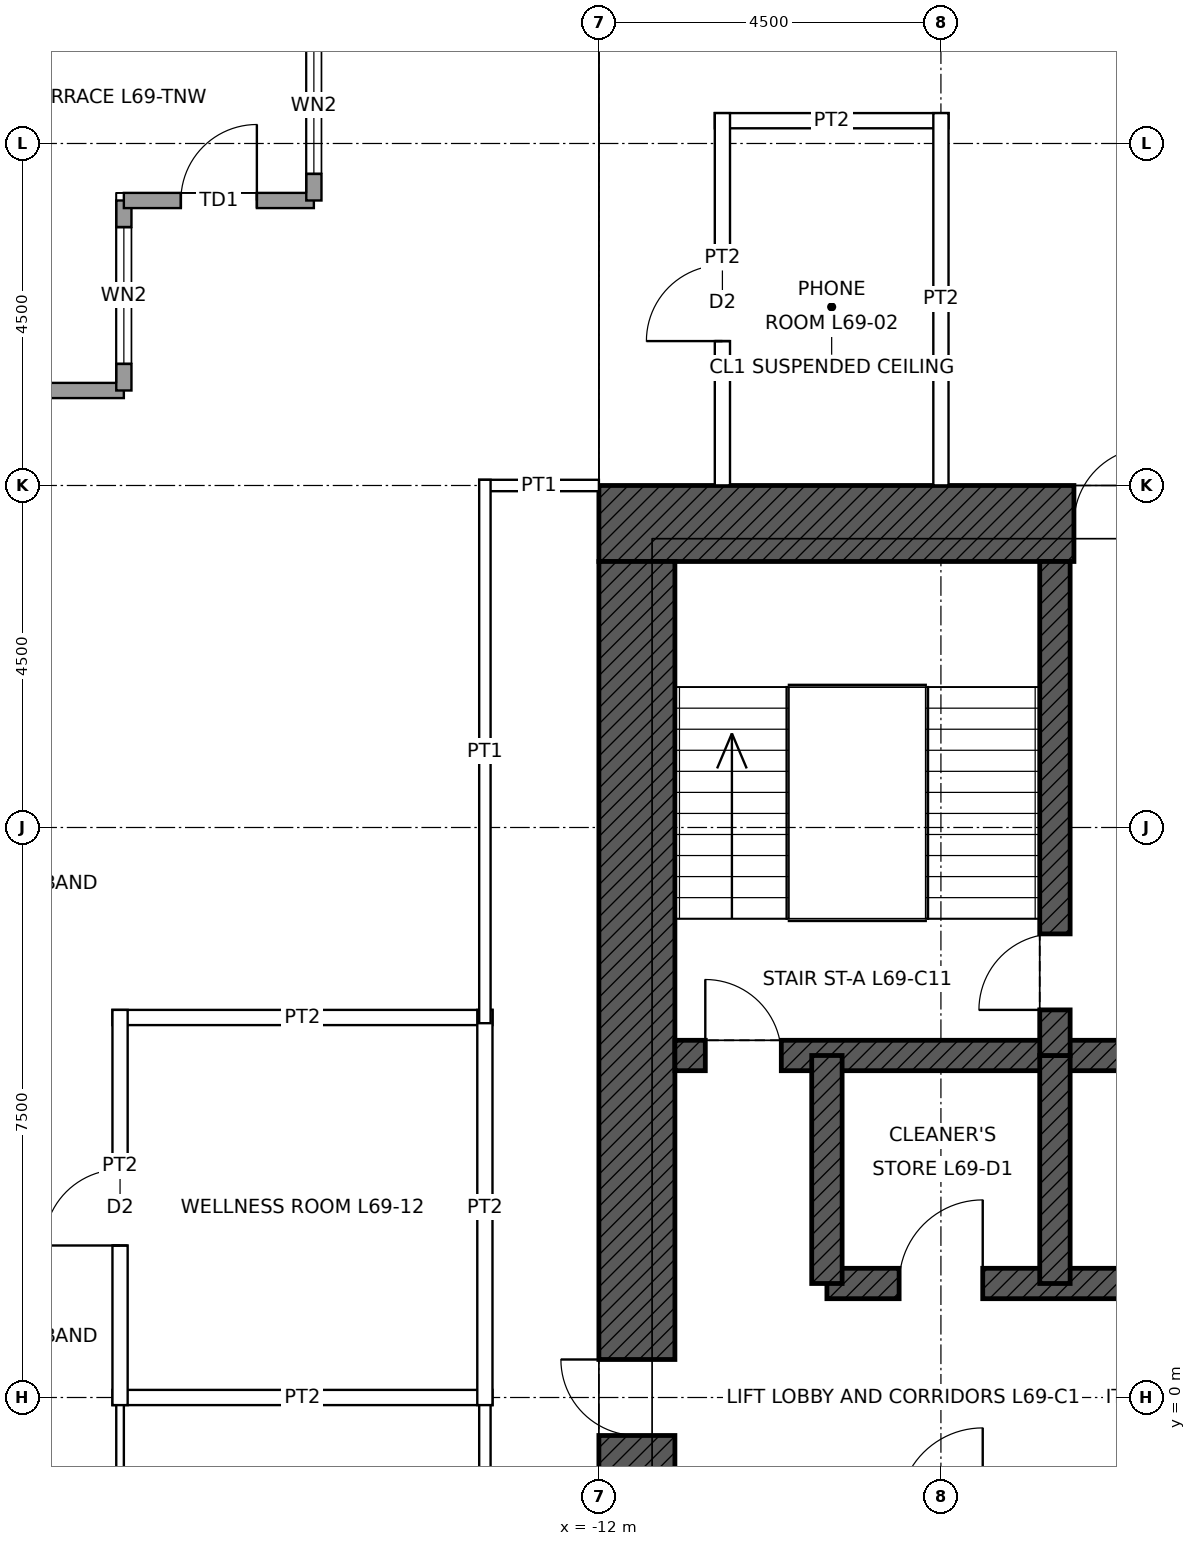
"""IFC4 building model, lengths in metres.
Left out: names, types, materials, properties, quantities, classifications, styles, units other than length and angle.
Written with IfcOpenShell. Run it as: python <this file> out.ifc"""

import sys

from ifc_helpers import new_model, si_unit, direction, frame, frame_2d, origin, place, context, subcontext, project, spatial, rectangle, extrude, element, fill, save


model = new_model("IFC4")
c1 = context("Model", 3, precision=1e-05, world=origin(), true_north=direction((0.0, 1.0)))
c2 = subcontext(c1, "Body", "Model", "MODEL_VIEW")
j1 = project(units=[si_unit("LENGTHUNIT", "METRE"), si_unit("PLANEANGLEUNIT", "RADIAN")], contexts=[c1])
p1 = place(None, origin())
s1 = spatial("IfcSite", under=j1, at=p1, CompositionType="ELEMENT")
p2 = place(p1, origin())
s2 = spatial("IfcBuilding", under=s1, at=p2, CompositionType="ELEMENT")
p3 = place(p2, frame((0.0, 0.0, 311.9)))
s3 = spatial("IfcBuildingStorey", under=s2, at=p3, CompositionType="ELEMENT", Elevation=311.9)
p4 = place(p3, frame((-12.0, 11.5, 0.0), z_axis=(0.0, 0.0, 1.0), x_axis=(1.0, 0.0, 0.0)))
e1 = element("IfcWall", 1, at=p4, inside=s3, PredefinedType="SHEAR", context=c2, shape_type="SweptSolid", body=[
    extrude(rectangle(XDim=24.0, YDim=1.0, at=frame_2d((12.0, 0.0))), origin(), (0.0, 0.0, 1.0), 4.0),
])
p5 = place(p4, frame((6.25, 0.0, 0.0)))
e2 = element("IfcOpeningElement", 2, at=p5, cuts=e1, PredefinedType="OPENING", context=c2, shape_type="SweptSolid", body=[
    extrude(rectangle(XDim=1.0, YDim=2.4, at=frame_2d((0.5, 1.2))), frame((0.0, 0.51, 0.0), z_axis=(0.0, -1.0, 0.0), x_axis=(1.0, 0.0, 0.0)), (0.0, 0.0, 1.0), 1.02),
])
p6 = place(p4, frame((16.75, 0.0, 0.0)))
e3 = element("IfcOpeningElement", 3, at=p6, cuts=e1, PredefinedType="OPENING", context=c2, shape_type="SweptSolid", body=[
    extrude(rectangle(XDim=1.0, YDim=2.4, at=frame_2d((0.5, 1.2))), frame((0.0, 0.51, 0.0), z_axis=(0.0, -1.0, 0.0), x_axis=(1.0, 0.0, 0.0)), (0.0, 0.0, 1.0), 1.02),
])
p7 = place(p3, frame((-11.5, -11.0, 0.0), z_axis=(0.0, 0.0, 1.0), x_axis=(0.0, 1.0, 0.0)))
e4 = element("IfcWall", 4, at=p7, inside=s3, PredefinedType="SHEAR", context=c2, shape_type="SweptSolid", body=[
    extrude(rectangle(XDim=22.0, YDim=1.0, at=frame_2d((11.0, 0.0))), origin(), (0.0, 0.0, 1.0), 4.0),
])
p8 = place(p7, frame((10.5, 0.0, 0.0)))
e5 = element("IfcOpeningElement", 5, at=p8, cuts=e4, PredefinedType="OPENING", context=c2, shape_type="SweptSolid", body=[
    extrude(rectangle(XDim=1.0, YDim=2.4, at=frame_2d((0.5, 1.2))), frame((0.0, 0.51, 0.0), z_axis=(0.0, -1.0, 0.0), x_axis=(1.0, 0.0, 0.0)), (0.0, 0.0, 1.0), 1.02),
])
p9 = place(p3, frame((-11.0, 4.5, 0.0), z_axis=(0.0, 0.0, 1.0), x_axis=(1.0, 0.0, 0.0)))
e6 = element("IfcWall", 6, at=p9, inside=s3, PredefinedType="SHEAR", context=c2, shape_type="SweptSolid", body=[
    extrude(rectangle(XDim=22.0, YDim=0.4, at=frame_2d((11.0, 0.0))), origin(), (0.0, 0.0, 1.0), 4.0),
])
p10 = place(p9, frame((0.4, 0.0, 0.0)))
e7 = element("IfcOpeningElement", 7, at=p10, cuts=e6, PredefinedType="OPENING", context=c2, shape_type="SweptSolid", body=[
    extrude(rectangle(XDim=1.0, YDim=2.1, at=frame_2d((0.5, 1.05))), frame((0.0, 0.21, 0.0), z_axis=(0.0, -1.0, 0.0), x_axis=(1.0, 0.0, 0.0)), (0.0, 0.0, 1.0), 0.42),
])
p11 = place(p9, frame((20.6, 0.0, 0.0)))
e8 = element("IfcOpeningElement", 8, at=p11, cuts=e6, PredefinedType="OPENING", context=c2, shape_type="SweptSolid", body=[
    extrude(rectangle(XDim=1.0, YDim=2.1, at=frame_2d((0.5, 1.05))), frame((0.0, 0.21, 0.0), z_axis=(0.0, -1.0, 0.0), x_axis=(1.0, 0.0, 0.0)), (0.0, 0.0, 1.0), 0.42),
])
p12 = place(p3, frame((-9.0, 1.5, 0.0), z_axis=(0.0, 0.0, 1.0), x_axis=(1.0, 0.0, 0.0)))
e9 = element("IfcWall", 9, at=p12, inside=s3, PredefinedType="SHEAR", context=c2, shape_type="SweptSolid", body=[
    extrude(rectangle(XDim=18.0, YDim=0.4, at=frame_2d((9.0, 0.0))), origin(), (0.0, 0.0, 1.0), 4.0),
])
p13 = place(p12, frame((0.95, 0.0, 0.0)))
e10 = element("IfcOpeningElement", 10, at=p13, cuts=e9, PredefinedType="OPENING", context=c2, shape_type="SweptSolid", body=[
    extrude(rectangle(XDim=1.1, YDim=2.1, at=frame_2d((0.55, 1.05))), frame((0.0, 0.21, 0.0), z_axis=(0.0, -1.0, 0.0), x_axis=(1.0, 0.0, 0.0)), (0.0, 0.0, 1.0), 0.42),
])
p14 = place(p12, frame((3.95, 0.0, 0.0)))
e11 = element("IfcOpeningElement", 11, at=p14, cuts=e9, PredefinedType="OPENING", context=c2, shape_type="SweptSolid", body=[
    extrude(rectangle(XDim=1.1, YDim=2.1, at=frame_2d((0.55, 1.05))), frame((0.0, 0.21, 0.0), z_axis=(0.0, -1.0, 0.0), x_axis=(1.0, 0.0, 0.0)), (0.0, 0.0, 1.0), 0.42),
])
p15 = place(p12, frame((6.95, 0.0, 0.0)))
e12 = element("IfcOpeningElement", 12, at=p15, cuts=e9, PredefinedType="OPENING", context=c2, shape_type="SweptSolid", body=[
    extrude(rectangle(XDim=1.1, YDim=2.1, at=frame_2d((0.55, 1.05))), frame((0.0, 0.21, 0.0), z_axis=(0.0, -1.0, 0.0), x_axis=(1.0, 0.0, 0.0)), (0.0, 0.0, 1.0), 0.42),
])
p16 = place(p12, frame((9.95, 0.0, 0.0)))
e13 = element("IfcOpeningElement", 13, at=p16, cuts=e9, PredefinedType="OPENING", context=c2, shape_type="SweptSolid", body=[
    extrude(rectangle(XDim=1.1, YDim=2.1, at=frame_2d((0.55, 1.05))), frame((0.0, 0.21, 0.0), z_axis=(0.0, -1.0, 0.0), x_axis=(1.0, 0.0, 0.0)), (0.0, 0.0, 1.0), 0.42),
])
p17 = place(p12, frame((12.95, 0.0, 0.0)))
e14 = element("IfcOpeningElement", 14, at=p17, cuts=e9, PredefinedType="OPENING", context=c2, shape_type="SweptSolid", body=[
    extrude(rectangle(XDim=1.1, YDim=2.1, at=frame_2d((0.55, 1.05))), frame((0.0, 0.21, 0.0), z_axis=(0.0, -1.0, 0.0), x_axis=(1.0, 0.0, 0.0)), (0.0, 0.0, 1.0), 0.42),
])
p18 = place(p12, frame((15.95, 0.0, 0.0)))
e15 = element("IfcOpeningElement", 15, at=p18, cuts=e9, PredefinedType="OPENING", context=c2, shape_type="SweptSolid", body=[
    extrude(rectangle(XDim=1.1, YDim=2.1, at=frame_2d((0.55, 1.05))), frame((0.0, 0.21, 0.0), z_axis=(0.0, -1.0, 0.0), x_axis=(1.0, 0.0, 0.0)), (0.0, 0.0, 1.0), 0.42),
])
for number, where, z_axis, x_axis in (
    (16, (-9.0, 1.5, 0.0), (0.0, 0.0, 1.0), (0.0, 1.0, 0.0)),
    (17, (-6.0, 1.5, 0.0), (0.0, 0.0, 1.0), (0.0, 1.0, 0.0)),
):
    element("IfcWall", number, at=place(p3, frame(where, z_axis=z_axis, x_axis=x_axis)), inside=s3, PredefinedType="SHEAR", context=c2, shape_type="SweptSolid", body=[
        extrude(rectangle(XDim=3.0, YDim=0.4, at=frame_2d((1.5, 0.0))), origin(), (0.0, 0.0, 1.0), 4.0),
    ])
p19 = place(p3, frame((-6.0, 4.5, 0.0), z_axis=(0.0, 0.0, 1.0), x_axis=(0.0, 1.0, 0.0)))
e18 = element("IfcWall", 18, at=p19, inside=s3, PredefinedType="SHEAR", context=c2, shape_type="SweptSolid", body=[
    extrude(rectangle(XDim=6.5, YDim=0.4, at=frame_2d((3.25, 0.0))), origin(), (0.0, 0.0, 1.0), 4.0),
])
p20 = place(p19, frame((0.6, 0.0, 0.0)))
e19 = element("IfcOpeningElement", 19, at=p20, cuts=e18, PredefinedType="OPENING", context=c2, shape_type="SweptSolid", body=[
    extrude(rectangle(XDim=1.0, YDim=2.1, at=frame_2d((0.5, 1.05))), frame((0.0, 0.21, 0.0), z_axis=(0.0, -1.0, 0.0), x_axis=(1.0, 0.0, 0.0)), (0.0, 0.0, 1.0), 0.42),
])
p21 = place(p3, frame((-20.75, 13.25, 0.0), z_axis=(0.0, 0.0, 1.0), x_axis=(1.0, 0.0, 0.0)))
e20 = element("IfcWall", 20, at=p21, inside=s3, PredefinedType="SOLIDWALL", context=c2, shape_type="SweptSolid", body=[
    extrude(rectangle(XDim=2.5, YDim=0.2, at=frame_2d((1.25, 0.0))), origin(), (0.0, 0.0, 1.0), 3.85),
])
p22 = place(p3, frame((-18.25, 13.25, 0.0), z_axis=(0.0, 0.0, 1.0), x_axis=(0.0, 1.0, 0.0)))
e21 = element("IfcWall", 21, at=p22, inside=s3, PredefinedType="SOLIDWALL", context=c2, shape_type="SweptSolid", body=[
    extrude(rectangle(XDim=2.5, YDim=0.2, at=frame_2d((1.25, 0.0))), origin(), (0.0, 0.0, 1.0), 3.85),
])
p23 = place(p22, frame((0.35, 0.0, 0.3)))
e22 = element("IfcOpeningElement", 22, at=p23, cuts=e21, PredefinedType="OPENING", context=c2, shape_type="SweptSolid", body=[
    extrude(rectangle(XDim=1.8, YDim=2.4, at=frame_2d((0.9, 1.2))), frame((0.0, 0.11, 0.0), z_axis=(0.0, -1.0, 0.0), x_axis=(1.0, 0.0, 0.0)), (0.0, 0.0, 1.0), 0.22),
])
p24 = place(p3, frame((-18.25, 15.75, 0.0), z_axis=(0.0, 0.0, 1.0), x_axis=(1.0, 0.0, 0.0)))
e23 = element("IfcWall", 23, at=p24, inside=s3, PredefinedType="SOLIDWALL", context=c2, shape_type="SweptSolid", body=[
    extrude(rectangle(XDim=2.5, YDim=0.2, at=frame_2d((1.25, 0.0))), origin(), (0.0, 0.0, 1.0), 3.317),
])
p25 = place(p24, frame((0.75, 0.0, 0.0)))
e24 = element("IfcOpeningElement", 24, at=p25, cuts=e23, PredefinedType="OPENING", context=c2, shape_type="SweptSolid", body=[
    extrude(rectangle(XDim=1.0, YDim=2.4, at=frame_2d((0.5, 1.2))), frame((0.0, 0.11, 0.0), z_axis=(0.0, -1.0, 0.0), x_axis=(1.0, 0.0, 0.0)), (0.0, 0.0, 1.0), 0.22),
])
p26 = place(p3, frame((-15.75, 15.75, 0.0), z_axis=(0.0, 0.0, 1.0), x_axis=(0.0, 1.0, 0.0)))
e25 = element("IfcWall", 25, at=p26, inside=s3, PredefinedType="SOLIDWALL", context=c2, shape_type="SweptSolid", body=[
    extrude(rectangle(XDim=2.5, YDim=0.2, at=frame_2d((1.25, 0.0))), origin(), (0.0, 0.0, 1.0), 3.85),
])
p27 = place(p26, frame((0.35, 0.0, 0.3)))
e26 = element("IfcOpeningElement", 26, at=p27, cuts=e25, PredefinedType="OPENING", context=c2, shape_type="SweptSolid", body=[
    extrude(rectangle(XDim=1.8, YDim=2.4, at=frame_2d((0.9, 1.2))), frame((0.0, 0.11, 0.0), z_axis=(0.0, -1.0, 0.0), x_axis=(1.0, 0.0, 0.0)), (0.0, 0.0, 1.0), 0.22),
])
p28 = place(p3, frame((-18.4, 0.0, 0.0), z_axis=(0.0, 0.0, 1.0), x_axis=(1.0, 0.0, 0.0)))
e27 = element("IfcWall", 27, at=p28, inside=s3, PredefinedType="PARTITIONING", context=c2, shape_type="SweptSolid", body=[
    extrude(rectangle(XDim=5.0, YDim=0.2, at=frame_2d((2.5, 0.0))), origin(), (0.0, 0.0, 1.0), 3.243),
])
p29 = place(p3, frame((-18.4, 5.0, 0.0), z_axis=(0.0, 0.0, 1.0), x_axis=(1.0, 0.0, 0.0)))
e28 = element("IfcWall", 28, at=p29, inside=s3, PredefinedType="PARTITIONING", context=c2, shape_type="SweptSolid", body=[
    extrude(rectangle(XDim=5.0, YDim=0.2, at=frame_2d((2.5, 0.0))), origin(), (0.0, 0.0, 1.0), 3.85),
])
p30 = place(p3, frame((-13.575, 12.0, 0.0), z_axis=(0.0, 0.0, 1.0), x_axis=(1.0, 0.0, 0.0)))
e29 = element("IfcWall", 29, at=p30, inside=s3, PredefinedType="PARTITIONING", context=c2, shape_type="SweptSolid", body=[
    extrude(rectangle(XDim=1.575, YDim=0.15, at=frame_2d((0.788, 0.0))), origin(), (0.0, 0.0, 1.0), 3.85),
])
p31 = place(p3, frame((-10.475, 16.8, 0.0), z_axis=(0.0, 0.0, 1.0), x_axis=(1.0, 0.0, 0.0)))
e30 = element("IfcWall", 30, at=p31, inside=s3, PredefinedType="PARTITIONING", context=c2, shape_type="SweptSolid", body=[
    extrude(rectangle(XDim=3.075, YDim=0.2, at=frame_2d((1.538, 0.0))), origin(), (0.0, 0.0, 1.0), 3.85),
])
p32 = place(p3, frame((-18.3, -5.05, 0.0), z_axis=(0.0, 0.0, 1.0), x_axis=(0.0, 1.0, 0.0)))
e31 = element("IfcWall", 31, at=p32, inside=s3, PredefinedType="PARTITIONING", context=c2, shape_type="SweptSolid", body=[
    extrude(rectangle(XDim=5.1, YDim=0.1, at=frame_2d((2.55, 0.0))), origin(), (0.0, 0.0, 1.0), 3.85),
])
p33 = place(p32, frame((2.05, 0.0, 0.0)))
e32 = element("IfcOpeningElement", 32, at=p33, cuts=e31, PredefinedType="OPENING", context=c2, shape_type="SweptSolid", body=[
    extrude(rectangle(XDim=1.0, YDim=2.1, at=frame_2d((0.5, 1.05))), frame((0.0, 0.06, 0.0), z_axis=(0.0, -1.0, 0.0), x_axis=(1.0, 0.0, 0.0)), (0.0, 0.0, 1.0), 0.12),
])
p34 = place(p3, frame((-18.3, -0.1, 0.0), z_axis=(0.0, 0.0, 1.0), x_axis=(0.0, 1.0, 0.0)))
e33 = element("IfcWall", 33, at=p34, inside=s3, PredefinedType="PARTITIONING", context=c2, shape_type="SweptSolid", body=[
    extrude(rectangle(XDim=5.2, YDim=0.2, at=frame_2d((2.6, 0.0))), origin(), (0.0, 0.0, 1.0), 3.85),
])
p35 = place(p34, frame((2.1, 0.0, 0.0)))
e34 = element("IfcOpeningElement", 34, at=p35, cuts=e33, PredefinedType="OPENING", context=c2, shape_type="SweptSolid", body=[
    extrude(rectangle(XDim=1.0, YDim=2.1, at=frame_2d((0.5, 1.05))), frame((0.0, 0.11, 0.0), z_axis=(0.0, -1.0, 0.0), x_axis=(1.0, 0.0, 0.0)), (0.0, 0.0, 1.0), 0.22),
])
p36 = place(p3, frame((-13.5, -13.575, 0.0), z_axis=(0.0, 0.0, 1.0), x_axis=(0.0, 1.0, 0.0)))
e35 = element("IfcWall", 35, at=p36, inside=s3, PredefinedType="PARTITIONING", context=c2, shape_type="SweptSolid", body=[
    extrude(rectangle(XDim=13.65, YDim=0.15, at=frame_2d((6.825, 0.0))), origin(), (0.0, 0.0, 1.0), 3.85),
])
p37 = place(p3, frame((-13.5, -0.1, 0.0), z_axis=(0.0, 0.0, 1.0), x_axis=(0.0, 1.0, 0.0)))
e36 = element("IfcWall", 36, at=p37, inside=s3, PredefinedType="PARTITIONING", context=c2, shape_type="SweptSolid", body=[
    extrude(rectangle(XDim=5.2, YDim=0.2, at=frame_2d((2.6, 0.0))), origin(), (0.0, 0.0, 1.0), 3.85),
])
p38 = place(p3, frame((-13.5, 4.925, 0.0), z_axis=(0.0, 0.0, 1.0), x_axis=(0.0, 1.0, 0.0)))
e37 = element("IfcWall", 37, at=p38, inside=s3, PredefinedType="PARTITIONING", context=c2, shape_type="SweptSolid", body=[
    extrude(rectangle(XDim=7.15, YDim=0.15, at=frame_2d((3.575, 0.0))), origin(), (0.0, 0.0, 1.0), 3.85),
])
p39 = place(p3, frame((-10.375, 12.0, 0.0), z_axis=(0.0, 0.0, 1.0), x_axis=(0.0, 1.0, 0.0)))
e38 = element("IfcWall", 38, at=p39, inside=s3, PredefinedType="PARTITIONING", context=c2, shape_type="SweptSolid", body=[
    extrude(rectangle(XDim=4.9, YDim=0.2, at=frame_2d((2.45, 0.0))), origin(), (0.0, 0.0, 1.0), 3.85),
])
p40 = place(p39, frame((1.9, 0.0, 0.0)))
e39 = element("IfcOpeningElement", 39, at=p40, cuts=e38, PredefinedType="OPENING", context=c2, shape_type="SweptSolid", body=[
    extrude(rectangle(XDim=1.0, YDim=2.1, at=frame_2d((0.5, 1.05))), frame((0.0, 0.11, 0.0), z_axis=(0.0, -1.0, 0.0), x_axis=(1.0, 0.0, 0.0)), (0.0, 0.0, 1.0), 0.22),
])
p41 = place(p3, frame((-7.5, 12.0, 0.0), z_axis=(0.0, 0.0, 1.0), x_axis=(0.0, 1.0, 0.0)))
e40 = element("IfcWall", 40, at=p41, inside=s3, PredefinedType="PARTITIONING", context=c2, shape_type="SweptSolid", body=[
    extrude(rectangle(XDim=4.9, YDim=0.2, at=frame_2d((2.45, 0.0))), origin(), (0.0, 0.0, 1.0), 3.243),
])
p42 = place(p23, origin())
e41 = element("IfcWindow", 41, at=p42, inside=s3, PartitioningType="SINGLE_PANEL", PredefinedType="WINDOW", context=c2, shape_type="SweptSolid", body=[
    extrude(rectangle(XDim=1.8, YDim=2.4, at=frame_2d((0.9, 1.2))), frame((0.0, 0.03, 0.0), z_axis=(0.0, -1.0, 0.0), x_axis=(1.0, 0.0, 0.0)), (0.0, 0.0, 1.0), 0.06),
])
fill(e22, e41)
p43 = place(p25, origin())
e42 = element("IfcDoor", 42, at=p43, inside=s3, OperationType="SINGLE_SWING_RIGHT", PredefinedType="DOOR", context=c2, shape_type="SweptSolid", body=[
    extrude(rectangle(XDim=1.0, YDim=2.4, at=frame_2d((0.5, 1.2))), frame((0.0, 0.025, 0.0), z_axis=(0.0, -1.0, 0.0), x_axis=(1.0, 0.0, 0.0)), (0.0, 0.0, 1.0), 0.05),
])
fill(e24, e42)
p44 = place(p27, origin())
e43 = element("IfcWindow", 43, at=p44, inside=s3, PartitioningType="SINGLE_PANEL", PredefinedType="WINDOW", context=c2, shape_type="SweptSolid", body=[
    extrude(rectangle(XDim=1.8, YDim=2.4, at=frame_2d((0.9, 1.2))), frame((0.0, 0.03, 0.0), z_axis=(0.0, -1.0, 0.0), x_axis=(1.0, 0.0, 0.0)), (0.0, 0.0, 1.0), 0.06),
])
fill(e26, e43)
p45 = place(p10, origin())
e44 = element("IfcDoor", 44, at=p45, inside=s3, OperationType="SINGLE_SWING_LEFT", PredefinedType="DOOR", context=c2, shape_type="SweptSolid", body=[
    extrude(rectangle(XDim=1.0, YDim=2.1, at=frame_2d((0.5, 1.05))), frame((0.0, 0.025, 0.0), z_axis=(0.0, -1.0, 0.0), x_axis=(1.0, 0.0, 0.0)), (0.0, 0.0, 1.0), 0.05),
])
fill(e7, e44)
p46 = place(p20, origin())
e45 = element("IfcDoor", 45, at=p46, inside=s3, OperationType="SINGLE_SWING_LEFT", PredefinedType="DOOR", context=c2, shape_type="SweptSolid", body=[
    extrude(rectangle(XDim=1.0, YDim=2.1, at=frame_2d((0.5, 1.05))), frame((0.0, 0.025, 0.0), z_axis=(0.0, -1.0, 0.0), x_axis=(1.0, 0.0, 0.0)), (0.0, 0.0, 1.0), 0.05),
])
fill(e19, e45)
p47 = place(p5, origin())
e46 = element("IfcDoor", 46, at=p47, inside=s3, OperationType="SINGLE_SWING_RIGHT", PredefinedType="DOOR", context=c2, shape_type="SweptSolid", body=[
    extrude(rectangle(XDim=1.0, YDim=2.4, at=frame_2d((0.5, 1.2))), frame((0.0, 0.485, 0.0), z_axis=(0.0, -1.0, 0.0), x_axis=(1.0, 0.0, 0.0)), (0.0, 0.0, 1.0), 0.05),
])
fill(e2, e46)
p48 = place(p8, origin())
e47 = element("IfcDoor", 47, at=p48, inside=s3, OperationType="SINGLE_SWING_RIGHT", PredefinedType="DOOR", context=c2, shape_type="SweptSolid", body=[
    extrude(rectangle(XDim=1.0, YDim=2.4, at=frame_2d((0.5, 1.2))), frame((0.0, 0.485, 0.0), z_axis=(0.0, -1.0, 0.0), x_axis=(1.0, 0.0, 0.0)), (0.0, 0.0, 1.0), 0.05),
])
fill(e5, e47)
p49 = place(p13, origin())
e48 = element("IfcDoor", 48, at=p49, inside=s3, OperationType="SINGLE_SWING_RIGHT", PredefinedType="DOOR", context=c2, shape_type="SweptSolid", body=[
    extrude(rectangle(XDim=1.1, YDim=2.1, at=frame_2d((0.55, 1.05))), frame((0.0, 0.025, 0.0), z_axis=(0.0, -1.0, 0.0), x_axis=(1.0, 0.0, 0.0)), (0.0, 0.0, 1.0), 0.05),
])
fill(e10, e48)
p50 = place(p40, origin())
e49 = element("IfcDoor", 49, at=p50, inside=s3, OperationType="SINGLE_SWING_LEFT", PredefinedType="DOOR", context=c2, shape_type="SweptSolid", body=[
    extrude(rectangle(XDim=1.0, YDim=2.1, at=frame_2d((0.5, 1.05))), frame((0.0, 0.025, 0.0), z_axis=(0.0, -1.0, 0.0), x_axis=(1.0, 0.0, 0.0)), (0.0, 0.0, 1.0), 0.05),
])
fill(e39, e49)
p51 = place(p35, origin())
e50 = element("IfcDoor", 50, at=p51, inside=s3, OperationType="SINGLE_SWING_LEFT", PredefinedType="DOOR", context=c2, shape_type="SweptSolid", body=[
    extrude(rectangle(XDim=1.0, YDim=2.1, at=frame_2d((0.5, 1.05))), frame((0.0, 0.025, 0.0), z_axis=(0.0, -1.0, 0.0), x_axis=(1.0, 0.0, 0.0)), (0.0, 0.0, 1.0), 0.05),
])
fill(e34, e50)
save(model, sys.argv[1])
